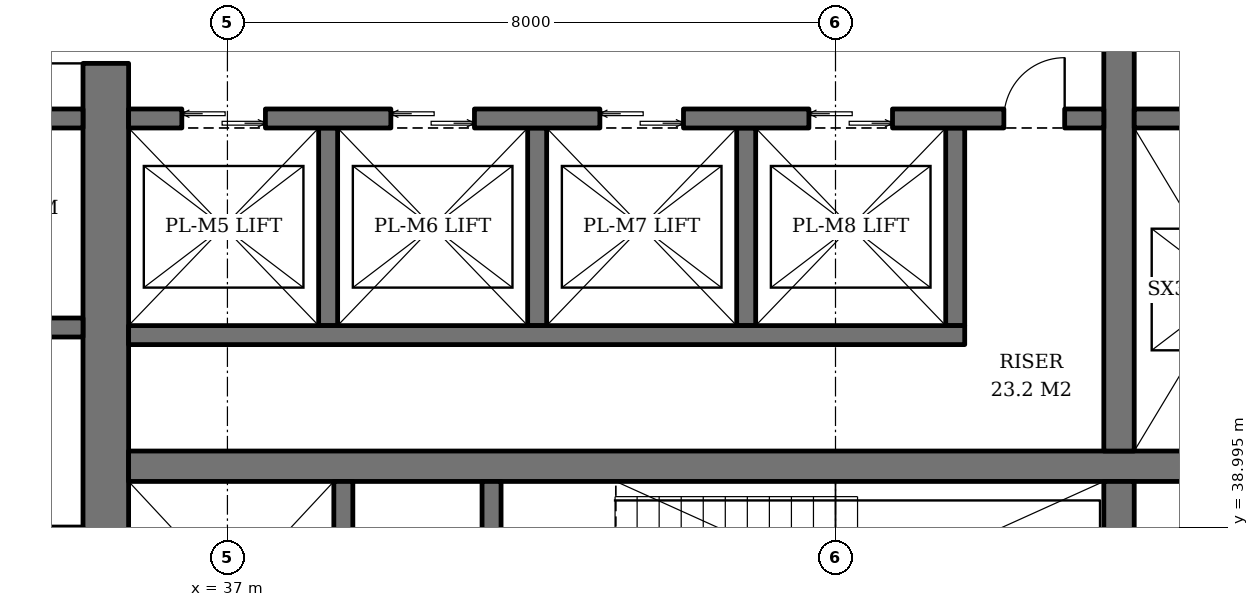
"""IFC4 building model, lengths in metres.
Left out: names, types, materials, properties, quantities, classifications, styles, units other than length and angle.
Written with IfcOpenShell. Run it as: python <this file> out.ifc"""

import sys

from ifc_helpers import new_model, si_unit, direction, frame, frame_2d, origin, place, context, subcontext, project, spatial, rectangle, extrude, element, fill, save


model = new_model("IFC4")
c1 = context("Model", 3, precision=1e-05, world=origin(), true_north=direction((0.0, 1.0)))
c2 = subcontext(c1, "Body", "Model", "MODEL_VIEW")
j1 = project(units=[si_unit("LENGTHUNIT", "METRE"), si_unit("PLANEANGLEUNIT", "RADIAN")], contexts=[c1])
p1 = place(None, origin())
s1 = spatial("IfcSite", under=j1, at=p1, CompositionType="ELEMENT")
p2 = place(p1, origin())
s2 = spatial("IfcBuilding", under=s1, at=p2, CompositionType="ELEMENT")
p3 = place(p2, frame((0.0, 0.0, 146.4)))
s3 = spatial("IfcBuildingStorey", under=s2, at=p3, CompositionType="ELEMENT", Elevation=146.4)
p4 = place(p3, frame((35.4, 36.7, 0.0), z_axis=(0.0, 0.0, 1.0), x_axis=(0.0, 1.0, 0.0)))
e1 = element("IfcWall", 1, at=p4, inside=s3, PredefinedType="SHEAR", context=c2, shape_type="SweptSolid", body=[
    extrude(rectangle(XDim=18.6, YDim=0.6, at=frame_2d((9.3, 0.0))), origin(), (0.0, 0.0, 1.0), 3.8),
])
p5 = place(p4, frame((8.4, 0.0, 0.0)))
e2 = element("IfcOpeningElement", 2, at=p5, cuts=e1, PredefinedType="OPENING", context=c2, shape_type="SweptSolid", body=[
    extrude(rectangle(XDim=1.8, YDim=2.4, at=frame_2d((0.9, 1.2))), frame((0.0, 0.31, 0.0), z_axis=(0.0, -1.0, 0.0), x_axis=(1.0, 0.0, 0.0)), (0.0, 0.0, 1.0), 0.62),
])
p6 = place(p3, frame((35.7, 39.8, 0.0), z_axis=(0.0, 0.0, 1.0), x_axis=(1.0, 0.0, 0.0)))
e3 = element("IfcWall", 3, at=p6, inside=s3, PredefinedType="SHEAR", context=c2, shape_type="SweptSolid", body=[
    extrude(rectangle(XDim=18.6, YDim=0.4, at=frame_2d((9.3, 0.0))), origin(), (0.0, 0.0, 1.0), 3.8),
])
p7 = place(p3, frame((48.73, 36.7, 0.0), z_axis=(0.0, 0.0, 1.0), x_axis=(0.0, 1.0, 0.0)))
e4 = element("IfcWall", 4, at=p7, inside=s3, PredefinedType="SHEAR", context=c2, shape_type="SweptSolid", body=[
    extrude(rectangle(XDim=2.9, YDim=0.4, at=frame_2d((1.45, 0.0))), origin(), (0.0, 0.0, 1.0), 3.8),
])
p8 = place(p3, frame((48.73, 40.0, 0.0), z_axis=(0.0, 0.0, 1.0), x_axis=(0.0, 1.0, 0.0)))
e5 = element("IfcWall", 5, at=p8, inside=s3, PredefinedType="SHEAR", context=c2, shape_type="SweptSolid", body=[
    extrude(rectangle(XDim=12.0, YDim=0.4, at=frame_2d((6.0, 0.0))), origin(), (0.0, 0.0, 1.0), 3.8),
])
p9 = place(p3, frame((38.525, 36.7, 0.0), z_axis=(0.0, 0.0, 1.0), x_axis=(0.0, 1.0, 0.0)))
e6 = element("IfcWall", 6, at=p9, inside=s3, PredefinedType="SHEAR", context=c2, shape_type="SweptSolid", body=[
    extrude(rectangle(XDim=2.9, YDim=0.25, at=frame_2d((1.45, 0.0))), origin(), (0.0, 0.0, 1.0), 3.8),
])
p10 = place(p9, frame((0.8, 0.0, 0.0)))
e7 = element("IfcOpeningElement", 7, at=p10, cuts=e6, PredefinedType="OPENING", context=c2, shape_type="SweptSolid", body=[
    extrude(rectangle(XDim=1.3, YDim=2.2, at=frame_2d((0.65, 1.1))), frame((0.0, 0.135, 0.0), z_axis=(0.0, -1.0, 0.0), x_axis=(1.0, 0.0, 0.0)), (0.0, 0.0, 1.0), 0.27),
])
p11 = place(p3, frame((40.475, 36.7, 0.0), z_axis=(0.0, 0.0, 1.0), x_axis=(0.0, 1.0, 0.0)))
e8 = element("IfcWall", 8, at=p11, inside=s3, PredefinedType="SHEAR", context=c2, shape_type="SweptSolid", body=[
    extrude(rectangle(XDim=2.9, YDim=0.25, at=frame_2d((1.45, 0.0))), origin(), (0.0, 0.0, 1.0), 3.8),
])
p12 = place(p11, frame((0.75, 0.0, 0.0)))
e9 = element("IfcOpeningElement", 9, at=p12, cuts=e8, PredefinedType="OPENING", context=c2, shape_type="SweptSolid", body=[
    extrude(rectangle(XDim=1.2, YDim=2.1, at=frame_2d((0.6, 1.05))), frame((0.0, 0.135, 0.0), z_axis=(0.0, -1.0, 0.0), x_axis=(1.0, 0.0, 0.0)), (0.0, 0.0, 1.0), 0.27),
])
for number, where, z_axis, x_axis in (
    (10, (38.325, 44.25, 0.0), (0.0, 0.0, 1.0), (0.0, -1.0, 0.0)),
    (11, (41.075, 44.25, 0.0), (0.0, 0.0, 1.0), (0.0, -1.0, 0.0)),
    (12, (43.825, 44.25, 0.0), (0.0, 0.0, 1.0), (0.0, -1.0, 0.0)),
    (13, (46.575, 44.25, 0.0), (0.0, 0.0, 1.0), (0.0, -1.0, 0.0)),
):
    element("IfcWall", number, at=place(p3, frame(where, z_axis=z_axis, x_axis=x_axis)), inside=s3, PredefinedType="SHEAR", context=c2, shape_type="SweptSolid", body=[
        extrude(rectangle(XDim=2.6, YDim=0.25, at=frame_2d((1.3, 0.0))), origin(), (0.0, 0.0, 1.0), 3.8),
    ])
p13 = place(p3, frame((35.7, 41.525, 0.0), z_axis=(0.0, 0.0, 1.0), x_axis=(1.0, 0.0, 0.0)))
e14 = element("IfcWall", 14, at=p13, inside=s3, PredefinedType="SHEAR", context=c2, shape_type="SweptSolid", body=[
    extrude(rectangle(XDim=11.0, YDim=0.25, at=frame_2d((5.5, 0.0))), origin(), (0.0, 0.0, 1.0), 3.8),
])
p14 = place(p3, frame((35.7, 44.375, 0.0), z_axis=(0.0, 0.0, 1.0), x_axis=(1.0, 0.0, 0.0)))
e15 = element("IfcWall", 15, at=p14, inside=s3, PredefinedType="SHEAR", context=c2, shape_type="SweptSolid", body=[
    extrude(rectangle(XDim=12.83, YDim=0.25, at=frame_2d((6.415, 0.0))), origin(), (0.0, 0.0, 1.0), 3.8),
])
p15 = place(p14, frame((0.7, 0.0, 0.0)))
e16 = element("IfcOpeningElement", 16, at=p15, cuts=e15, PredefinedType="OPENING", context=c2, shape_type="SweptSolid", body=[
    extrude(rectangle(XDim=1.1, YDim=2.2, at=frame_2d((0.55, 1.1))), frame((0.0, 0.135, 0.0), z_axis=(0.0, -1.0, 0.0), x_axis=(1.0, 0.0, 0.0)), (0.0, 0.0, 1.0), 0.27),
])
p16 = place(p14, frame((3.45, 0.0, 0.0)))
e17 = element("IfcOpeningElement", 17, at=p16, cuts=e15, PredefinedType="OPENING", context=c2, shape_type="SweptSolid", body=[
    extrude(rectangle(XDim=1.1, YDim=2.2, at=frame_2d((0.55, 1.1))), frame((0.0, 0.135, 0.0), z_axis=(0.0, -1.0, 0.0), x_axis=(1.0, 0.0, 0.0)), (0.0, 0.0, 1.0), 0.27),
])
p17 = place(p14, frame((6.2, 0.0, 0.0)))
e18 = element("IfcOpeningElement", 18, at=p17, cuts=e15, PredefinedType="OPENING", context=c2, shape_type="SweptSolid", body=[
    extrude(rectangle(XDim=1.1, YDim=2.2, at=frame_2d((0.55, 1.1))), frame((0.0, 0.135, 0.0), z_axis=(0.0, -1.0, 0.0), x_axis=(1.0, 0.0, 0.0)), (0.0, 0.0, 1.0), 0.27),
])
p18 = place(p14, frame((8.95, 0.0, 0.0)))
e19 = element("IfcOpeningElement", 19, at=p18, cuts=e15, PredefinedType="OPENING", context=c2, shape_type="SweptSolid", body=[
    extrude(rectangle(XDim=1.1, YDim=2.2, at=frame_2d((0.55, 1.1))), frame((0.0, 0.135, 0.0), z_axis=(0.0, -1.0, 0.0), x_axis=(1.0, 0.0, 0.0)), (0.0, 0.0, 1.0), 0.27),
])
p19 = place(p14, frame((11.515, 0.0, 0.0)))
e20 = element("IfcOpeningElement", 20, at=p19, cuts=e15, PredefinedType="OPENING", context=c2, shape_type="SweptSolid", body=[
    extrude(rectangle(XDim=0.8, YDim=2.0, at=frame_2d((0.4, 1.0))), frame((0.0, 0.135, 0.0), z_axis=(0.0, -1.0, 0.0), x_axis=(1.0, 0.0, 0.0)), (0.0, 0.0, 1.0), 0.27),
])
p20 = place(p3, frame((48.93, 44.375, 0.0), z_axis=(0.0, 0.0, 1.0), x_axis=(1.0, 0.0, 0.0)))
e21 = element("IfcWall", 21, at=p20, inside=s3, PredefinedType="SHEAR", context=c2, shape_type="SweptSolid", body=[
    extrude(rectangle(XDim=5.37, YDim=0.25, at=frame_2d((2.685, 0.0))), origin(), (0.0, 0.0, 1.0), 3.8),
])
for number, where, z_axis, x_axis in (
    (22, (32.4, 41.625, 0.0), (0.0, 0.0, 1.0), (1.0, 0.0, 0.0)),
    (23, (32.4, 44.375, 0.0), (0.0, 0.0, 1.0), (1.0, 0.0, 0.0)),
):
    element("IfcWall", number, at=place(p3, frame(where, z_axis=z_axis, x_axis=x_axis)), inside=s3, PredefinedType="SHEAR", context=c2, shape_type="SweptSolid", body=[
        extrude(rectangle(XDim=2.7, YDim=0.25, at=frame_2d((1.35, 0.0))), origin(), (0.0, 0.0, 1.0), 3.8),
    ])
p21 = place(p15, origin())
e24 = element("IfcDoor", 24, at=p21, inside=s3, OperationType="DOUBLE_DOOR_SLIDING", PredefinedType="DOOR", context=c2, shape_type="SweptSolid", body=[
    extrude(rectangle(XDim=1.1, YDim=2.2, at=frame_2d((0.55, 1.1))), frame((0.0, 0.025, 0.0), z_axis=(0.0, -1.0, 0.0), x_axis=(1.0, 0.0, 0.0)), (0.0, 0.0, 1.0), 0.05),
])
fill(e16, e24)
p22 = place(p16, origin())
e25 = element("IfcDoor", 25, at=p22, inside=s3, OperationType="DOUBLE_DOOR_SLIDING", PredefinedType="DOOR", context=c2, shape_type="SweptSolid", body=[
    extrude(rectangle(XDim=1.1, YDim=2.2, at=frame_2d((0.55, 1.1))), frame((0.0, 0.025, 0.0), z_axis=(0.0, -1.0, 0.0), x_axis=(1.0, 0.0, 0.0)), (0.0, 0.0, 1.0), 0.05),
])
fill(e17, e25)
p23 = place(p17, origin())
e26 = element("IfcDoor", 26, at=p23, inside=s3, OperationType="DOUBLE_DOOR_SLIDING", PredefinedType="DOOR", context=c2, shape_type="SweptSolid", body=[
    extrude(rectangle(XDim=1.1, YDim=2.2, at=frame_2d((0.55, 1.1))), frame((0.0, 0.025, 0.0), z_axis=(0.0, -1.0, 0.0), x_axis=(1.0, 0.0, 0.0)), (0.0, 0.0, 1.0), 0.05),
])
fill(e18, e26)
p24 = place(p18, origin())
e27 = element("IfcDoor", 27, at=p24, inside=s3, OperationType="DOUBLE_DOOR_SLIDING", PredefinedType="DOOR", context=c2, shape_type="SweptSolid", body=[
    extrude(rectangle(XDim=1.1, YDim=2.2, at=frame_2d((0.55, 1.1))), frame((0.0, 0.025, 0.0), z_axis=(0.0, -1.0, 0.0), x_axis=(1.0, 0.0, 0.0)), (0.0, 0.0, 1.0), 0.05),
])
fill(e19, e27)
p25 = place(p19, origin())
e28 = element("IfcDoor", 28, at=p25, inside=s3, OperationType="SINGLE_SWING_RIGHT", PredefinedType="DOOR", context=c2, shape_type="SweptSolid", body=[
    extrude(rectangle(XDim=0.8, YDim=2.0, at=frame_2d((0.4, 1.0))), frame((0.0, 0.025, 0.0), z_axis=(0.0, -1.0, 0.0), x_axis=(1.0, 0.0, 0.0)), (0.0, 0.0, 1.0), 0.05),
])
fill(e20, e28)
p26 = place(p5, origin())
e29 = element("IfcDoor", 29, at=p26, inside=s3, OperationType="DOUBLE_DOOR_SINGLE_SWING", PredefinedType="DOOR", context=c2, shape_type="SweptSolid", body=[
    extrude(rectangle(XDim=1.8, YDim=2.4, at=frame_2d((0.9, 1.2))), frame((0.0, 0.025, 0.0), z_axis=(0.0, -1.0, 0.0), x_axis=(1.0, 0.0, 0.0)), (0.0, 0.0, 1.0), 0.05),
])
fill(e2, e29)
save(model, sys.argv[1])
